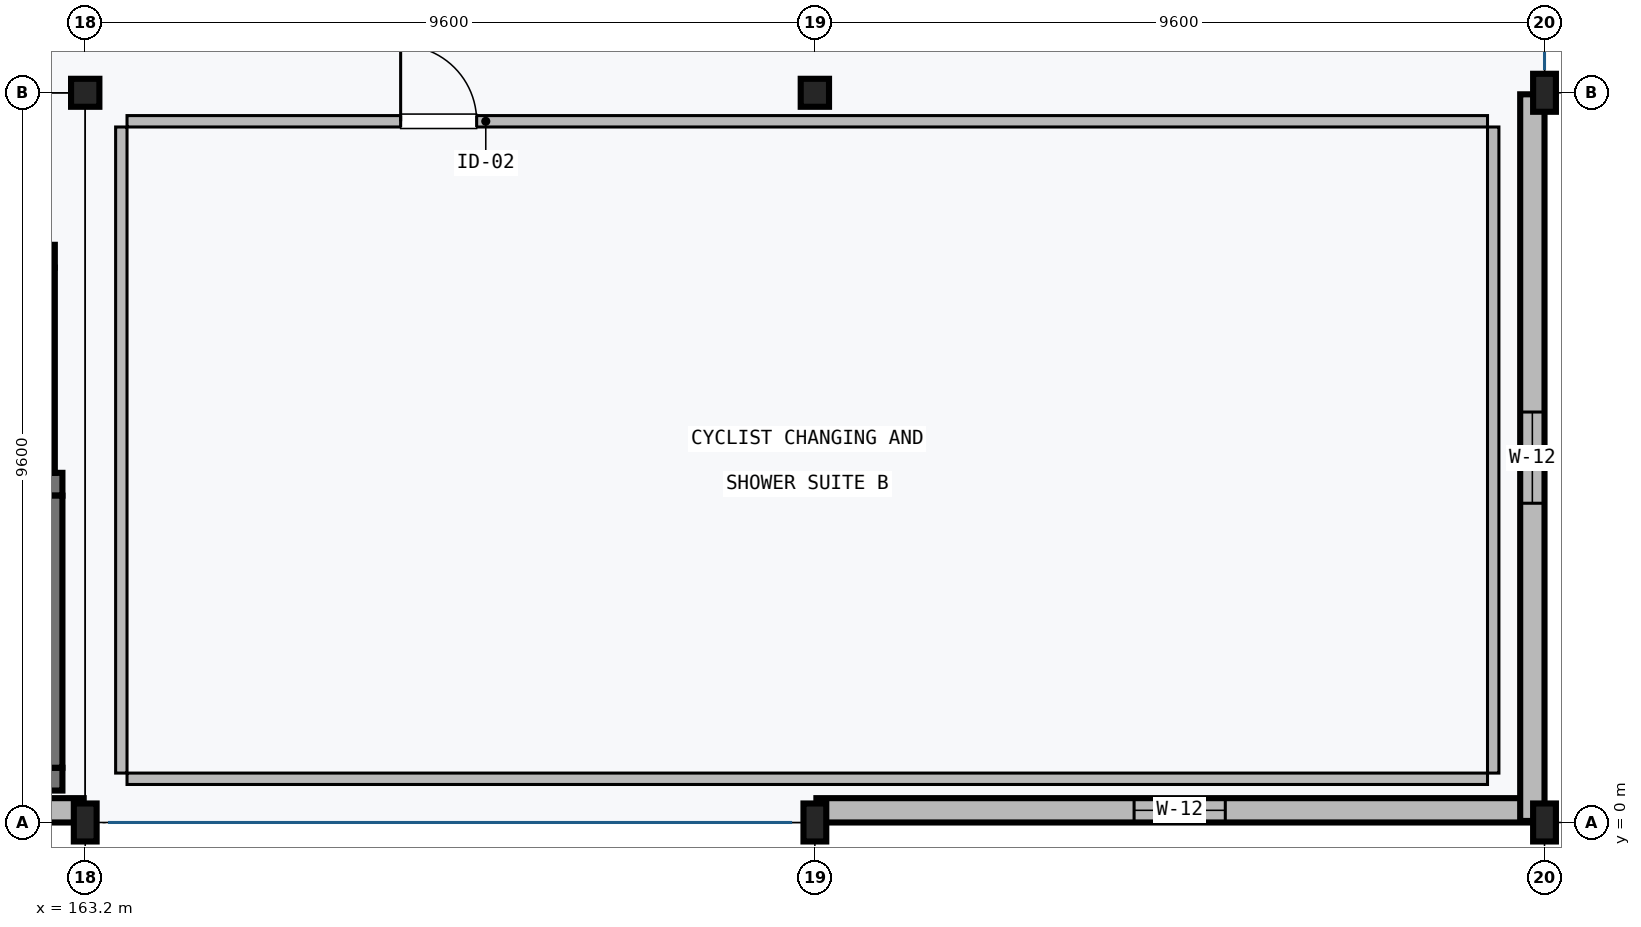
"""IFC4 building model, lengths in metres.
Left out: names, types, materials, properties, quantities, classifications, styles, units other than length and angle.
Written with IfcOpenShell. Run it as: python <this file> out.ifc"""

import sys

from ifc_helpers import new_model, si_unit, direction, frame, frame_2d, origin, origin_2d, place, context, subcontext, project, spatial, rectangle, i_section, extrude, element, fill, save


model = new_model("IFC4")
c1 = context("Model", 3, precision=1e-05, world=origin(), true_north=direction((0.0, 1.0)))
c2 = subcontext(c1, "Body", "Model", "MODEL_VIEW")
j1 = project(units=[si_unit("LENGTHUNIT", "METRE"), si_unit("PLANEANGLEUNIT", "RADIAN")], contexts=[c1])
p1 = place(None, origin())
s1 = spatial("IfcSite", under=j1, at=p1, CompositionType="ELEMENT")
p2 = place(p1, origin())
s2 = spatial("IfcBuilding", under=s1, at=p2, CompositionType="ELEMENT")
p3 = place(p2, frame((0.0, 0.0, 6.0)))
s3 = spatial("IfcBuildingStorey", under=s2, at=p3, CompositionType="ELEMENT", Elevation=6.0)
p4 = place(p3, frame((163.2, 0.0, 0.0), z_axis=(0.0, 0.0, 1.0), x_axis=(1.0, 0.0, 0.0)))
e1 = element("IfcColumn", 1, at=p4, inside=s3, PredefinedType="COLUMN", context=c2, shape_type="SweptSolid", body=[
    extrude(i_section(OverallWidth=0.3, OverallDepth=0.5, WebThickness=0.014, FlangeThickness=0.028, FilletRadius=0.027, at=origin_2d()), origin(), (0.0, 0.0, 1.0), 4.25),
])
p5 = place(p3, frame((163.2, 9.6, 0.0), z_axis=(0.0, 0.0, 1.0), x_axis=(1.0, 0.0, 0.0)))
e2 = element("IfcColumn", 2, at=p5, inside=s3, PredefinedType="COLUMN", context=c2, shape_type="SweptSolid", body=[
    extrude(i_section(OverallWidth=0.373, OverallDepth=0.368, WebThickness=0.014, FlangeThickness=0.024, FilletRadius=0.015, at=origin_2d()), origin(), (0.0, 0.0, 1.0), 4.25),
])
p6 = place(p3, frame((172.8, 0.0, 0.0), z_axis=(0.0, 0.0, 1.0), x_axis=(1.0, 0.0, 0.0)))
e3 = element("IfcColumn", 3, at=p6, inside=s3, PredefinedType="COLUMN", context=c2, shape_type="SweptSolid", body=[
    extrude(i_section(OverallWidth=0.3, OverallDepth=0.5, WebThickness=0.014, FlangeThickness=0.028, FilletRadius=0.027, at=origin_2d()), origin(), (0.0, 0.0, 1.0), 4.25),
])
p7 = place(p3, frame((172.8, 9.6, 0.0), z_axis=(0.0, 0.0, 1.0), x_axis=(1.0, 0.0, 0.0)))
e4 = element("IfcColumn", 4, at=p7, inside=s3, PredefinedType="COLUMN", context=c2, shape_type="SweptSolid", body=[
    extrude(i_section(OverallWidth=0.373, OverallDepth=0.368, WebThickness=0.014, FlangeThickness=0.024, FilletRadius=0.015, at=origin_2d()), origin(), (0.0, 0.0, 1.0), 4.25),
])
for number, where, z_axis, x_axis in (
    (5, (182.4, 0.0, 0.0), (0.0, 0.0, 1.0), (1.0, 0.0, 0.0)),
    (6, (182.4, 9.6, 0.0), (0.0, 0.0, 1.0), (1.0, 0.0, 0.0)),
):
    element("IfcColumn", number, at=place(p3, frame(where, z_axis=z_axis, x_axis=x_axis)), inside=s3, PredefinedType="COLUMN", context=c2, shape_type="SweptSolid", body=[
        extrude(i_section(OverallWidth=0.3, OverallDepth=0.5, WebThickness=0.014, FlangeThickness=0.028, FilletRadius=0.027, at=origin_2d()), origin(), (0.0, 0.0, 1.0), 4.25),
    ])
p8 = place(p3, frame((153.9, 0.57, 0.0), z_axis=(0.0, 0.0, 1.0), x_axis=(1.0, 0.0, 0.0)))
e7 = element("IfcWall", 7, at=p8, inside=s3, PredefinedType="SHEAR", context=c2, shape_type="SweptSolid", body=[
    extrude(rectangle(XDim=9.0, YDim=0.3, at=frame_2d((4.5, 0.0))), origin(), (0.0, 0.0, 1.0), 4.25),
])
p9 = place(p3, frame((162.9, 4.45, 0.0), z_axis=(0.0, 0.0, 1.0), x_axis=(-1.0, 0.0, 0.0)))
e8 = element("IfcWall", 8, at=p9, inside=s3, PredefinedType="SHEAR", context=c2, shape_type="SweptSolid", body=[
    extrude(rectangle(XDim=9.0, YDim=0.3, at=frame_2d((4.5, 0.0))), origin(), (0.0, 0.0, 1.0), 4.5),
])
p10 = place(p9, frame((7.2, 0.0, 0.0)))
e9 = element("IfcOpeningElement", 9, at=p10, cuts=e8, PredefinedType="OPENING", context=c2, shape_type="SweptSolid", body=[
    extrude(rectangle(XDim=1.15, YDim=2.15, at=frame_2d((0.575, 1.075))), frame((0.0, 0.16, 0.0), z_axis=(0.0, -1.0, 0.0), x_axis=(1.0, 0.0, 0.0)), (0.0, 0.0, 1.0), 0.32),
])
p11 = place(p3, frame((162.75, 4.3, 0.0), z_axis=(0.0, 0.0, 1.0), x_axis=(0.0, -1.0, 0.0)))
e10 = element("IfcWall", 10, at=p11, inside=s3, PredefinedType="SHEAR", context=c2, shape_type="SweptSolid", body=[
    extrude(rectangle(XDim=3.58, YDim=0.3, at=frame_2d((1.79, 0.0))), origin(), (0.0, 0.0, 1.0), 4.25),
])
p12 = place(p3, frame((162.65, 4.6, 0.0), z_axis=(0.0, 0.0, 1.0), x_axis=(0.0, 1.0, 0.0)))
e11 = element("IfcWall", 11, at=p12, inside=s3, PredefinedType="SHEAR", context=c2, shape_type="SweptSolid", body=[
    extrude(rectangle(XDim=2.7, YDim=0.3, at=frame_2d((1.35, 0.0))), origin(), (0.0, 0.0, 1.0), 4.5),
])
p13 = place(p3, frame((159.7, 7.45, 0.0), z_axis=(0.0, 0.0, 1.0), x_axis=(1.0, 0.0, 0.0)))
e12 = element("IfcWall", 12, at=p13, inside=s3, PredefinedType="SHEAR", context=c2, shape_type="SweptSolid", body=[
    extrude(rectangle(XDim=3.1, YDim=0.3, at=frame_2d((1.55, 0.0))), origin(), (0.0, 0.0, 1.0), 4.5),
])
p14 = place(p3, frame((163.18, 0.16, 0.0), z_axis=(0.0, 0.0, 1.0), x_axis=(-1.0, 0.0, 0.0)))
e13 = element("IfcWall", 13, at=p14, inside=s3, PredefinedType="SOLIDWALL", context=c2, shape_type="SweptSolid", body=[
    extrude(rectangle(XDim=9.56, YDim=0.32, at=frame_2d((4.78, 0.0))), origin(), (0.0, 0.0, 1.0), 3.9),
])
p15 = place(p3, frame((182.38, 0.16, 0.0), z_axis=(0.0, 0.0, 1.0), x_axis=(-1.0, 0.0, 0.0)))
e14 = element("IfcWall", 14, at=p15, inside=s3, PredefinedType="SOLIDWALL", context=c2, shape_type="SweptSolid", body=[
    extrude(rectangle(XDim=9.56, YDim=0.32, at=frame_2d((4.78, 0.0))), origin(), (0.0, 0.0, 1.0), 3.9),
])
p16 = place(p15, frame((4.18, 0.0, 0.9)))
e15 = element("IfcOpeningElement", 15, at=p16, cuts=e14, PredefinedType="OPENING", context=c2, shape_type="SweptSolid", body=[
    extrude(rectangle(XDim=1.2, YDim=1.8, at=frame_2d((0.6, 0.9))), frame((0.0, 0.17, 0.0), z_axis=(0.0, -1.0, 0.0), x_axis=(1.0, 0.0, 0.0)), (0.0, 0.0, 1.0), 0.34),
])
p17 = place(p3, frame((182.24, 9.58, 0.0), z_axis=(0.0, 0.0, 1.0), x_axis=(0.0, -1.0, 0.0)))
e16 = element("IfcWall", 16, at=p17, inside=s3, PredefinedType="SOLIDWALL", context=c2, shape_type="SweptSolid", body=[
    extrude(rectangle(XDim=9.56, YDim=0.32, at=frame_2d((4.78, 0.0))), origin(), (0.0, 0.0, 1.0), 3.717),
])
p18 = place(p17, frame((4.18, 0.0, 0.9)))
e17 = element("IfcOpeningElement", 17, at=p18, cuts=e16, PredefinedType="OPENING", context=c2, shape_type="SweptSolid", body=[
    extrude(rectangle(XDim=1.2, YDim=1.8, at=frame_2d((0.6, 0.9))), frame((0.0, 0.17, 0.0), z_axis=(0.0, -1.0, 0.0), x_axis=(1.0, 0.0, 0.0)), (0.0, 0.0, 1.0), 0.34),
])
p19 = place(p3, frame((181.65, 0.575, 0.0), z_axis=(0.0, 0.0, 1.0), x_axis=(-1.0, 0.0, 0.0)))
e18 = element("IfcWall", 18, at=p19, inside=s3, PredefinedType="PLUMBINGWALL", context=c2, shape_type="SweptSolid", body=[
    extrude(rectangle(XDim=17.9, YDim=0.15, at=frame_2d((8.95, 0.0))), origin(), (0.0, 0.0, 1.0), 3.707),
])
p20 = place(p3, frame((163.75, 9.225, 0.0), z_axis=(0.0, 0.0, 1.0), x_axis=(1.0, 0.0, 0.0)))
e19 = element("IfcWall", 19, at=p20, inside=s3, PredefinedType="PLUMBINGWALL", context=c2, shape_type="SweptSolid", body=[
    extrude(rectangle(XDim=17.9, YDim=0.15, at=frame_2d((8.95, 0.0))), origin(), (0.0, 0.0, 1.0), 3.707),
])
p21 = place(p20, frame((3.6, 0.0, 0.0)))
e20 = element("IfcOpeningElement", 20, at=p21, cuts=e19, PredefinedType="OPENING", context=c2, shape_type="SweptSolid", body=[
    extrude(rectangle(XDim=1.0, YDim=2.15, at=frame_2d((0.5, 1.075))), frame((0.0, 0.085, 0.0), z_axis=(0.0, -1.0, 0.0), x_axis=(1.0, 0.0, 0.0)), (0.0, 0.0, 1.0), 0.17),
])
for number, where, z_axis, x_axis in (
    (21, (163.675, 0.65, 0.0), (0.0, 0.0, 1.0), (0.0, 1.0, 0.0)),
    (22, (181.725, 9.15, 0.0), (0.0, 0.0, 1.0), (0.0, -1.0, 0.0)),
):
    element("IfcWall", number, at=place(p3, frame(where, z_axis=z_axis, x_axis=x_axis)), inside=s3, PredefinedType="PLUMBINGWALL", context=c2, shape_type="SweptSolid", body=[
        extrude(rectangle(XDim=8.5, YDim=0.15, at=frame_2d((4.25, 0.0))), origin(), (0.0, 0.0, 1.0), 3.89),
    ])
p22 = place(p16, origin())
e23 = element("IfcWindow", 23, at=p22, inside=s3, PartitioningType="SINGLE_PANEL", PredefinedType="WINDOW", context=c2, shape_type="SweptSolid", body=[
    extrude(rectangle(XDim=1.2, YDim=1.8, at=frame_2d((0.6, 0.9))), frame((0.0, 0.03, 0.0), z_axis=(0.0, -1.0, 0.0), x_axis=(1.0, 0.0, 0.0)), (0.0, 0.0, 1.0), 0.06),
])
fill(e15, e23)
p23 = place(p18, origin())
e24 = element("IfcWindow", 24, at=p23, inside=s3, PartitioningType="SINGLE_PANEL", PredefinedType="WINDOW", context=c2, shape_type="SweptSolid", body=[
    extrude(rectangle(XDim=1.2, YDim=1.8, at=frame_2d((0.6, 0.9))), frame((0.0, 0.03, 0.0), z_axis=(0.0, -1.0, 0.0), x_axis=(1.0, 0.0, 0.0)), (0.0, 0.0, 1.0), 0.06),
])
fill(e17, e24)
p24 = place(p21, origin())
e25 = element("IfcDoor", 25, at=p24, inside=s3, OperationType="SINGLE_SWING_LEFT", PredefinedType="DOOR", context=c2, shape_type="SweptSolid", body=[
    extrude(rectangle(XDim=1.0, YDim=2.15, at=frame_2d((0.5, 1.075))), frame((0.0, 0.025, 0.0), z_axis=(0.0, -1.0, 0.0), x_axis=(1.0, 0.0, 0.0)), (0.0, 0.0, 1.0), 0.05),
])
fill(e20, e25)
save(model, sys.argv[1])
